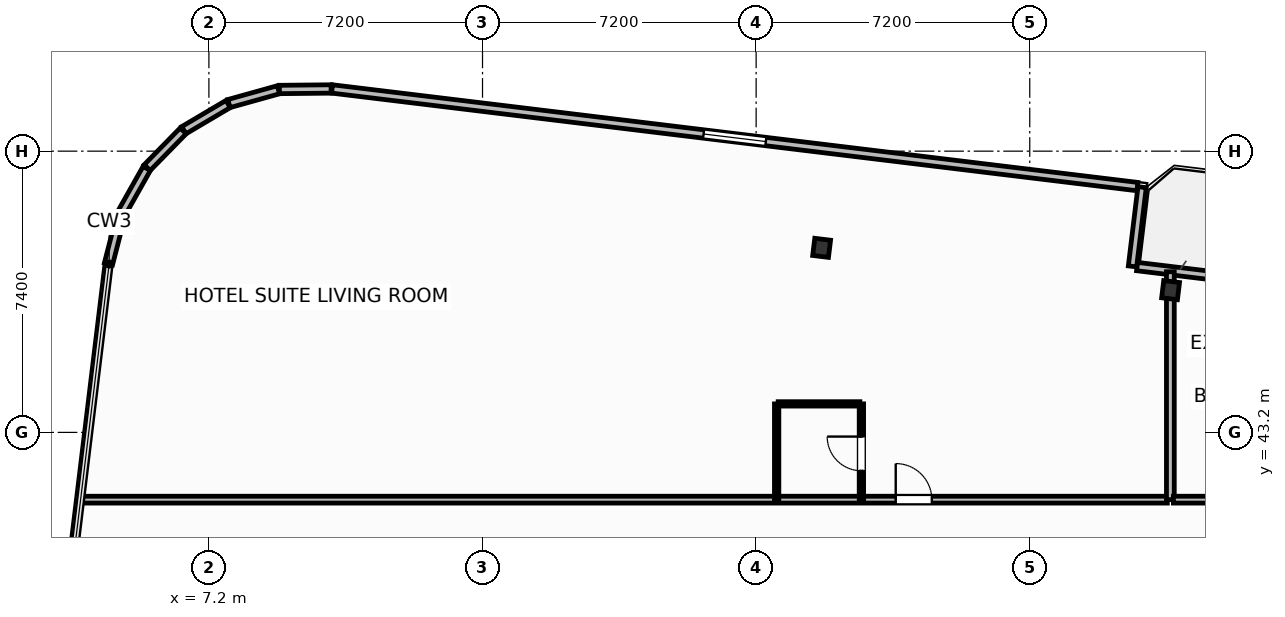
"""IFC4 building model, lengths in metres.
Left out: names, types, materials, properties, quantities, classifications, styles, units other than length and angle.
Written with IfcOpenShell. Run it as: python <this file> out.ifc"""

import sys

from ifc_helpers import new_model, si_unit, direction, frame, frame_2d, origin, origin_2d, place, context, subcontext, project, spatial, rectangle, i_section, extrude, element, fill, save


model = new_model("IFC4")
c1 = context("Model", 3, precision=1e-05, world=origin(), true_north=direction((0.0, 1.0)))
c2 = subcontext(c1, "Body", "Model", "MODEL_VIEW")
j1 = project(units=[si_unit("LENGTHUNIT", "METRE"), si_unit("PLANEANGLEUNIT", "RADIAN")], contexts=[c1])
p1 = place(None, origin())
s1 = spatial("IfcSite", under=j1, at=p1, CompositionType="ELEMENT")
p2 = place(p1, origin())
s2 = spatial("IfcBuilding", under=s1, at=p2, CompositionType="ELEMENT")
p3 = place(p2, frame((0.0, 0.0, 121.7)))
s3 = spatial("IfcBuildingStorey", under=s2, at=p3, CompositionType="ELEMENT", Elevation=121.7)
for number, where, z_axis, x_axis in (
    (1, (32.506, 46.943, 0.0), (0.0, 0.0, 1.0), (0.993, -0.12, 0.0)),
    (2, (23.323, 48.056, 0.0), (0.0, 0.0, 1.0), (0.993, -0.12, 0.0)),
):
    element("IfcColumn", number, at=place(p3, frame(where, z_axis=z_axis, x_axis=x_axis)), inside=s3, PredefinedType="COLUMN", context=c2, shape_type="SweptSolid", body=[
        extrude(i_section(OverallWidth=0.418, OverallDepth=0.455, WebThickness=0.042, FlangeThickness=0.068, FilletRadius=0.025, at=origin_2d()), origin(), (0.0, 0.0, 1.0), 3.7),
    ])
p4 = place(p3, frame((31.624, 47.563, 0.0), z_axis=(0.0, 0.0, 1.0), x_axis=(0.992729951822, -0.120362962556, 0.0)))
e3 = element("IfcWall", 3, at=p4, inside=s3, PredefinedType="SOLIDWALL", context=c2, shape_type="SweptSolid", body=[
    extrude(rectangle(XDim=6.0, YDim=0.22, at=frame_2d((3.0, 0.0))), origin(), (0.0, 0.0, 1.0), 2.73),
])
p5 = place(p4, frame((2.176, 0.0, 0.0)))
e4 = element("IfcOpeningElement", 4, at=p5, cuts=e3, PredefinedType="OPENING", context=c2, shape_type="SweptSolid", body=[
    extrude(rectangle(XDim=1.5, YDim=2.25, at=frame_2d((0.75, 1.125))), frame((0.0, 0.12, 0.0), z_axis=(0.0, -1.0, 0.0), x_axis=(1.0, 0.0, 0.0)), (0.0, 0.0, 1.0), 0.24),
])
p6 = place(p3, frame((31.504, 47.568, 0.0), z_axis=(0.0, 0.0, 1.0), x_axis=(0.120341784665, 0.992732519294, 0.0)))
e5 = element("IfcWall", 5, at=p6, inside=s3, PredefinedType="SOLIDWALL", context=c2, shape_type="SweptSolid", body=[
    extrude(rectangle(XDim=2.1, YDim=0.22, at=frame_2d((1.05, 0.0))), origin(), (0.0, 0.0, 1.0), 2.73),
])
p7 = place(p3, frame((31.633, 49.668, 0.0), z_axis=(0.0, 0.0, 1.0), x_axis=(-0.992731670483, 0.120348786531, 0.0)))
e6 = element("IfcWall", 6, at=p7, inside=s3, PredefinedType="SOLIDWALL", context=c2, shape_type="SweptSolid", body=[
    extrude(rectangle(XDim=21.347, YDim=0.22, at=frame_2d((10.674, 0.0))), origin(), (0.0, 0.0, 1.0), 2.73),
])
p8 = place(p7, frame((9.849, 0.0, 0.8)))
e7 = element("IfcOpeningElement", 7, at=p8, cuts=e6, PredefinedType="OPENING", context=c2, shape_type="SweptSolid", body=[
    extrude(rectangle(XDim=1.65, YDim=1.65, at=frame_2d((0.825, 0.825))), frame((0.0, 0.12, 0.0), z_axis=(0.0, -1.0, 0.0), x_axis=(1.0, 0.0, 0.0)), (0.0, 0.0, 1.0), 0.24),
])
p9 = place(p3, frame((10.416, 52.237, 0.0), z_axis=(0.0, 0.0, 1.0), x_axis=(-0.999947718056, -0.010225514878, 0.0)))
e8 = element("IfcWall", 8, at=p9, inside=s3, PredefinedType="SOLIDWALL", context=c2, shape_type="SweptSolid", body=[
    extrude(rectangle(XDim=1.361, YDim=0.22, at=frame_2d((0.68, 0.0))), origin(), (0.0, 0.0, 1.0), 2.73),
])
for number, where, z_axis, x_axis in (
    (9, (9.031, 52.216, 0.0), (0.0, 0.0, 1.0), (-0.963, -0.269, 0.0)),
    (10, (7.706, 51.84, 0.0), (0.0, 0.0, 1.0), (-0.861, -0.509, 0.0)),
):
    element("IfcWall", number, at=place(p3, frame(where, z_axis=z_axis, x_axis=x_axis)), inside=s3, PredefinedType="SOLIDWALL", context=c2, shape_type="SweptSolid", body=[
        extrude(rectangle(XDim=1.353, YDim=0.22, at=frame_2d((0.677, 0.0))), origin(), (0.0, 0.0, 1.0), 2.73),
    ])
p10 = place(p3, frame((6.523, 51.133, 0.0), z_axis=(0.0, 0.0, 1.0), x_axis=(-0.699762925925, -0.714375144795, 0.0)))
e11 = element("IfcWall", 11, at=p10, inside=s3, PredefinedType="SOLIDWALL", context=c2, shape_type="SweptSolid", body=[
    extrude(rectangle(XDim=1.353, YDim=0.22, at=frame_2d((0.677, 0.0))), origin(), (0.0, 0.0, 1.0), 2.73),
])
p11 = place(p3, frame((5.564, 50.145, 0.0), z_axis=(0.0, 0.0, 1.0), x_axis=(-0.491117621399, -0.871093268227, 0.0)))
e12 = element("IfcWall", 12, at=p11, inside=s3, PredefinedType="SOLIDWALL", context=c2, shape_type="SweptSolid", body=[
    extrude(rectangle(XDim=1.353, YDim=0.22, at=frame_2d((0.677, 0.0))), origin(), (0.0, 0.0, 1.0), 2.73),
])
p12 = place(p3, frame((4.894, 48.942, 0.0), z_axis=(0.0, 0.0, 1.0), x_axis=(-0.248857256909, -0.968540172468, 0.0)))
e13 = element("IfcWall", 13, at=p12, inside=s3, PredefinedType="SOLIDWALL", context=c2, shape_type="SweptSolid", body=[
    extrude(rectangle(XDim=1.353, YDim=0.22, at=frame_2d((0.676, 0.0))), origin(), (0.0, 0.0, 1.0), 2.73),
])
p13 = place(p3, frame((3.864, 41.43, 0.0), z_axis=(0.0, 0.0, 1.0), x_axis=(1.0, 0.0, 0.0)))
e14 = element("IfcWall", 14, at=p13, inside=s3, PredefinedType="PARTITIONING", context=c2, shape_type="SweptSolid", body=[
    extrude(rectangle(XDim=28.556, YDim=0.18, at=frame_2d((14.278, 0.0))), origin(), (0.0, 0.0, 1.0), 3.45),
])
p14 = place(p13, frame((21.409, 0.0, 0.0)))
e15 = element("IfcOpeningElement", 15, at=p14, cuts=e14, PredefinedType="OPENING", context=c2, shape_type="SweptSolid", body=[
    extrude(rectangle(XDim=0.95, YDim=2.15, at=frame_2d((0.475, 1.075))), frame((0.0, 0.1, 0.0), z_axis=(0.0, -1.0, 0.0), x_axis=(1.0, 0.0, 0.0)), (0.0, 0.0, 1.0), 0.2),
])
p15 = place(p3, frame((22.18, 43.95, 0.0), z_axis=(0.0, 0.0, 1.0), x_axis=(1.0, 0.0, 0.0)))
e16 = element("IfcWall", 16, at=p15, inside=s3, PredefinedType="PARTITIONING", context=c2, shape_type="SweptSolid", body=[
    extrude(rectangle(XDim=2.15, YDim=0.115, at=frame_2d((1.075, 0.0))), origin(), (0.0, 0.0, 1.0), 3.45),
])
p16 = place(p3, frame((24.37, 41.43, 0.0), z_axis=(0.0, 0.0, 1.0), x_axis=(0.0, 1.0, 0.0)))
e17 = element("IfcWall", 17, at=p16, inside=s3, PredefinedType="PARTITIONING", context=c2, shape_type="SweptSolid", body=[
    extrude(rectangle(XDim=2.52, YDim=0.115, at=frame_2d((1.26, 0.0))), origin(), (0.0, 0.0, 1.0), 3.45),
])
p17 = place(p16, frame((0.76, 0.0, 0.0)))
e18 = element("IfcOpeningElement", 18, at=p17, cuts=e17, PredefinedType="OPENING", context=c2, shape_type="SweptSolid", body=[
    extrude(rectangle(XDim=0.9, YDim=2.05, at=frame_2d((0.45, 1.025))), frame((0.0, 0.067, 0.0), z_axis=(0.0, -1.0, 0.0), x_axis=(1.0, 0.0, 0.0)), (0.0, 0.0, 1.0), 0.135),
])
p18 = place(p3, frame((22.14, 41.43, 0.0), z_axis=(0.0, 0.0, 1.0), x_axis=(0.0, 1.0, 0.0)))
e19 = element("IfcWall", 19, at=p18, inside=s3, PredefinedType="PARTITIONING", context=c2, shape_type="SweptSolid", body=[
    extrude(rectangle(XDim=2.52, YDim=0.115, at=frame_2d((1.26, 0.0))), origin(), (0.0, 0.0, 1.0), 3.45),
])
p19 = place(p3, frame((32.5, 41.43, 0.0), z_axis=(0.0, 0.0, 1.0), x_axis=(0.0, 1.0, 0.0)))
e20 = element("IfcWall", 20, at=p19, inside=s3, PredefinedType="PARTITIONING", context=c2, shape_type="SweptSolid", body=[
    extrude(rectangle(XDim=5.997, YDim=0.205, at=frame_2d((2.999, 0.0))), origin(), (0.0, 0.0, 1.0), 2.662),
])
p20 = place(p3, frame((32.58, 41.43, 0.0), z_axis=(0.0, 0.0, 1.0), x_axis=(1.0, 0.0, 0.0)))
e21 = element("IfcWall", 21, at=p20, inside=s3, PredefinedType="PARTITIONING", context=c2, shape_type="SweptSolid", body=[
    extrude(rectangle(XDim=9.84, YDim=0.18, at=frame_2d((4.92, 0.0))), origin(), (0.0, 0.0, 1.0), 3.45),
])
p21 = place(p20, frame((5.68, 0.0, 0.0)))
e22 = element("IfcOpeningElement", 22, at=p21, cuts=e21, PredefinedType="OPENING", context=c2, shape_type="SweptSolid", body=[
    extrude(rectangle(XDim=0.95, YDim=2.15, at=frame_2d((0.475, 1.075))), frame((0.0, 0.1, 0.0), z_axis=(0.0, -1.0, 0.0), x_axis=(1.0, 0.0, 0.0)), (0.0, 0.0, 1.0), 0.2),
])
p22 = place(p8, origin())
e23 = element("IfcWindow", 23, at=p22, inside=s3, PartitioningType="SINGLE_PANEL", PredefinedType="WINDOW", context=c2, shape_type="SweptSolid", body=[
    extrude(rectangle(XDim=1.65, YDim=1.65, at=frame_2d((0.825, 0.825))), frame((0.0, 0.03, 0.0), z_axis=(0.0, -1.0, 0.0), x_axis=(1.0, 0.0, 0.0)), (0.0, 0.0, 1.0), 0.06),
])
fill(e7, e23)
p23 = place(p14, origin())
e24 = element("IfcDoor", 24, at=p23, inside=s3, OperationType="SINGLE_SWING_LEFT", PredefinedType="DOOR", context=c2, shape_type="SweptSolid", body=[
    extrude(rectangle(XDim=0.95, YDim=2.15, at=frame_2d((0.475, 1.075))), frame((0.0, 0.025, 0.0), z_axis=(0.0, -1.0, 0.0), x_axis=(1.0, 0.0, 0.0)), (0.0, 0.0, 1.0), 0.05),
])
fill(e15, e24)
p24 = place(p17, origin())
e25 = element("IfcDoor", 25, at=p24, inside=s3, OperationType="SINGLE_SWING_RIGHT", PredefinedType="DOOR", context=c2, shape_type="SweptSolid", body=[
    extrude(rectangle(XDim=0.9, YDim=2.05, at=frame_2d((0.45, 1.025))), frame((0.0, 0.025, 0.0), z_axis=(0.0, -1.0, 0.0), x_axis=(1.0, 0.0, 0.0)), (0.0, 0.0, 1.0), 0.05),
])
fill(e18, e25)
save(model, sys.argv[1])
